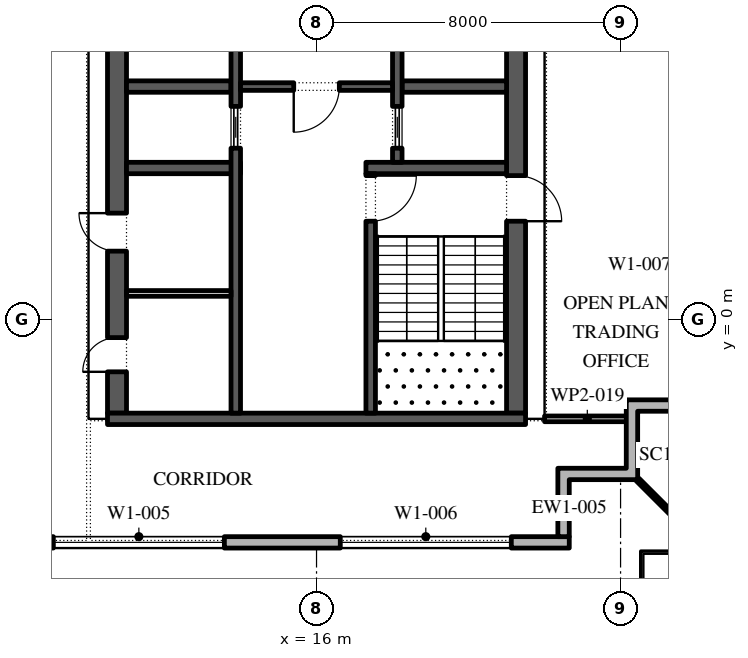
"""IFC4 building model, lengths in metres.
Left out: names, types, materials, properties, quantities, classifications, styles, units other than length and angle.
Written with IfcOpenShell. Run it as: python <this file> out.ifc"""

import sys

from ifc_helpers import new_model, si_unit, direction, frame, frame_2d, origin, place, context, subcontext, project, spatial, polyline, rectangle, outline, extrude, element, fill, save


model = new_model("IFC4")
c1 = context("Model", 3, precision=1e-05, world=origin(), true_north=direction((0.0, 1.0)))
c2 = subcontext(c1, "Body", "Model", "MODEL_VIEW")
j1 = project(units=[si_unit("LENGTHUNIT", "METRE"), si_unit("PLANEANGLEUNIT", "RADIAN")], contexts=[c1])
p1 = place(None, origin())
s1 = spatial("IfcSite", under=j1, at=p1, CompositionType="ELEMENT")
p2 = place(p1, origin())
s2 = spatial("IfcBuilding", under=s1, at=p2, CompositionType="ELEMENT")
p3 = place(p2, frame((0.0, 0.0, 330.0)))
s3 = spatial("IfcBuildingStorey", under=s2, at=p3, CompositionType="ELEMENT", Elevation=330.0)
p4 = place(p3, frame((-22.35, -5.85, 0.0), z_axis=(0.0, 0.0, 1.0), x_axis=(1.0, 0.0, 0.0)))
e1 = element("IfcWall", 1, at=p4, inside=s3, PredefinedType="STANDARD", context=c2, shape_type="SweptSolid", body=[
    extrude(rectangle(XDim=45.0, YDim=0.3, at=frame_2d((22.5, 0.0))), origin(), (0.0, 0.0, 1.0), 4.0),
])
p5 = place(p4, frame((1.375, 0.0, 0.45)))
e2 = element("IfcOpeningElement", 2, at=p5, cuts=e1, PredefinedType="OPENING", context=c2, shape_type="SweptSolid", body=[
    extrude(rectangle(XDim=4.5, YDim=3.05, at=frame_2d((2.25, 1.525))), frame((0.0, 0.16, 0.0), z_axis=(0.0, -1.0, 0.0), x_axis=(1.0, 0.0, 0.0)), (0.0, 0.0, 1.0), 0.32),
])
p6 = place(p4, frame((8.775, 0.0, 0.45)))
e3 = element("IfcOpeningElement", 3, at=p6, cuts=e1, PredefinedType="OPENING", context=c2, shape_type="SweptSolid", body=[
    extrude(rectangle(XDim=4.5, YDim=3.05, at=frame_2d((2.25, 1.525))), frame((0.0, 0.16, 0.0), z_axis=(0.0, -1.0, 0.0), x_axis=(1.0, 0.0, 0.0)), (0.0, 0.0, 1.0), 0.32),
])
p7 = place(p4, frame((17.375, 0.0, 0.0)))
e4 = element("IfcOpeningElement", 4, at=p7, cuts=e1, PredefinedType="OPENING", context=c2, shape_type="SweptSolid", body=[
    extrude(rectangle(XDim=2.4, YDim=3.5, at=frame_2d((1.2, 1.75))), frame((0.0, 0.16, 0.0), z_axis=(0.0, -1.0, 0.0), x_axis=(1.0, 0.0, 0.0)), (0.0, 0.0, 1.0), 0.32),
])
p8 = place(p4, frame((23.875, 0.0, 0.45)))
e5 = element("IfcOpeningElement", 5, at=p8, cuts=e1, PredefinedType="OPENING", context=c2, shape_type="SweptSolid", body=[
    extrude(rectangle(XDim=4.5, YDim=3.05, at=frame_2d((2.25, 1.525))), frame((0.0, 0.16, 0.0), z_axis=(0.0, -1.0, 0.0), x_axis=(1.0, 0.0, 0.0)), (0.0, 0.0, 1.0), 0.32),
])
p9 = place(p4, frame((31.425, 0.0, 0.45)))
e6 = element("IfcOpeningElement", 6, at=p9, cuts=e1, PredefinedType="OPENING", context=c2, shape_type="SweptSolid", body=[
    extrude(rectangle(XDim=4.5, YDim=3.05, at=frame_2d((2.25, 1.525))), frame((0.0, 0.16, 0.0), z_axis=(0.0, -1.0, 0.0), x_axis=(1.0, 0.0, 0.0)), (0.0, 0.0, 1.0), 0.32),
])
p10 = place(p4, frame((38.975, 0.0, 0.45)))
e7 = element("IfcOpeningElement", 7, at=p10, cuts=e1, PredefinedType="OPENING", context=c2, shape_type="SweptSolid", body=[
    extrude(rectangle(XDim=4.5, YDim=3.05, at=frame_2d((2.25, 1.525))), frame((0.0, 0.16, 0.0), z_axis=(0.0, -1.0, 0.0), x_axis=(1.0, 0.0, 0.0)), (0.0, 0.0, 1.0), 0.32),
])
p11 = place(p3, origin())
e8 = element("IfcWall", 8, at=p11, inside=s3, PredefinedType="STANDARD", context=c2, shape_type="SweptSolid", body=[
    extrude(outline(polyline([(24.15, -3.9), (24.15, -2.1), (26.25, -2.1), (26.25, -2.4), (24.45, -2.4), (24.45, -4.2), (22.65, -4.2), (22.65, -5.7), (22.35, -5.7), (22.35, -3.9), (24.15, -3.9)])), origin(), (0.0, 0.0, 1.0), 4.0),
])
p12 = place(p3, frame((24.45, -4.2, -0.05), z_axis=(0.0, 0.0, 1.0), x_axis=(0.707106781187, -0.707106781187, 0.0)))
e9 = element("IfcWall", 9, at=p12, inside=s3, PredefinedType="STANDARD", context=c2, shape_type="SweptSolid", body=[
    extrude(rectangle(XDim=2.667, YDim=0.1, at=frame_2d((1.333, 0.0))), origin(), (0.0, 0.0, 1.0), 4.05),
])
p13 = place(p3, frame((21.25, -2.45, 0.0), z_axis=(0.0, 0.0, 1.0), x_axis=(0.0, 1.0, 0.0)))
e10 = element("IfcWall", 10, at=p13, inside=s3, PredefinedType="SHEAR", context=c2, shape_type="SweptSolid", body=[
    extrude(rectangle(XDim=27.9, YDim=0.5, at=frame_2d((13.95, 0.0))), origin(), (0.0, 0.0, 1.0), 4.0),
])
p14 = place(p13, frame((5.05, 0.0, 0.0)))
e11 = element("IfcOpeningElement", 11, at=p14, cuts=e10, PredefinedType="OPENING", context=c2, shape_type="SweptSolid", body=[
    extrude(rectangle(XDim=1.2, YDim=2.1, at=frame_2d((0.6, 1.05))), frame((0.0, 0.26, 0.0), z_axis=(0.0, -1.0, 0.0), x_axis=(1.0, 0.0, 0.0)), (0.0, 0.0, 1.0), 0.52),
])
p15 = place(p13, frame((21.65, 0.0, 0.0)))
e12 = element("IfcOpeningElement", 12, at=p15, cuts=e10, PredefinedType="OPENING", context=c2, shape_type="SweptSolid", body=[
    extrude(rectangle(XDim=1.2, YDim=2.1, at=frame_2d((0.6, 1.05))), frame((0.0, 0.26, 0.0), z_axis=(0.0, -1.0, 0.0), x_axis=(1.0, 0.0, 0.0)), (0.0, 0.0, 1.0), 0.52),
])
p16 = place(p3, frame((10.75, -2.45, 0.0), z_axis=(0.0, 0.0, 1.0), x_axis=(0.0, 1.0, 0.0)))
e13 = element("IfcWall", 13, at=p16, inside=s3, PredefinedType="SHEAR", context=c2, shape_type="SweptSolid", body=[
    extrude(rectangle(XDim=27.9, YDim=0.5, at=frame_2d((13.95, 0.0))), origin(), (0.0, 0.0, 1.0), 4.0),
])
p17 = place(p16, frame((23.65, 0.0, 0.0)))
e14 = element("IfcOpeningElement", 14, at=p17, cuts=e13, PredefinedType="OPENING", context=c2, shape_type="SweptSolid", body=[
    extrude(rectangle(XDim=2.4, YDim=2.1, at=frame_2d((1.2, 1.05))), frame((0.0, 0.26, 0.0), z_axis=(0.0, -1.0, 0.0), x_axis=(1.0, 0.0, 0.0)), (0.0, 0.0, 1.0), 0.52),
])
p18 = place(p16, frame((1.087, 0.0, 0.0)))
e15 = element("IfcOpeningElement", 15, at=p18, cuts=e13, PredefinedType="OPENING", context=c2, shape_type="SweptSolid", body=[
    extrude(rectangle(XDim=0.9, YDim=2.1, at=frame_2d((0.45, 1.05))), frame((0.0, 0.26, 0.0), z_axis=(0.0, -1.0, 0.0), x_axis=(1.0, 0.0, 0.0)), (0.0, 0.0, 1.0), 0.52),
])
p19 = place(p16, frame((4.262, 0.0, 0.0)))
e16 = element("IfcOpeningElement", 16, at=p19, cuts=e13, PredefinedType="OPENING", context=c2, shape_type="SweptSolid", body=[
    extrude(rectangle(XDim=1.0, YDim=2.1, at=frame_2d((0.5, 1.05))), frame((0.0, 0.26, 0.0), z_axis=(0.0, -1.0, 0.0), x_axis=(1.0, 0.0, 0.0)), (0.0, 0.0, 1.0), 0.52),
])
p20 = place(p3, frame((10.5, -2.6, 0.0), z_axis=(0.0, 0.0, 1.0), x_axis=(1.0, 0.0, 0.0)))
e17 = element("IfcWall", 17, at=p20, inside=s3, PredefinedType="SHEAR", context=c2, shape_type="SweptSolid", body=[
    extrude(rectangle(XDim=11.0, YDim=0.3, at=frame_2d((5.5, 0.0))), origin(), (0.0, 0.0, 1.0), 4.0),
])
p21 = place(p3, frame((17.3, 4.0, 0.0), z_axis=(0.0, 0.0, 1.0), x_axis=(1.0, 0.0, 0.0)))
e18 = element("IfcWall", 18, at=p21, inside=s3, PredefinedType="SHEAR", context=c2, shape_type="SweptSolid", body=[
    extrude(rectangle(XDim=3.7, YDim=0.3, at=frame_2d((1.85, 0.0))), origin(), (0.0, 0.0, 1.0), 4.0),
])
p22 = place(p3, frame((17.425, -2.45, 0.0), z_axis=(0.0, 0.0, 1.0), x_axis=(0.0, 1.0, 0.0)))
e19 = element("IfcWall", 19, at=p22, inside=s3, PredefinedType="SHEAR", context=c2, shape_type="SweptSolid", body=[
    extrude(rectangle(XDim=6.3, YDim=0.25, at=frame_2d((3.15, 0.0))), origin(), (0.0, 0.0, 1.0), 4.0),
])
p23 = place(p22, frame((5.05, 0.0, 0.0)))
e20 = element("IfcOpeningElement", 20, at=p23, cuts=e19, PredefinedType="OPENING", context=c2, shape_type="SweptSolid", body=[
    extrude(rectangle(XDim=1.2, YDim=2.1, at=frame_2d((0.6, 1.05))), frame((0.0, 0.135, 0.0), z_axis=(0.0, -1.0, 0.0), x_axis=(1.0, 0.0, 0.0)), (0.0, 0.0, 1.0), 0.27),
])
p24 = place(p3, frame((18.25, 6.143, 0.0), z_axis=(0.0, 0.0, 1.0), x_axis=(1.0, 0.0, 0.0)))
e21 = element("IfcWall", 21, at=p24, inside=s3, PredefinedType="SHEAR", context=c2, shape_type="SweptSolid", body=[
    extrude(rectangle(XDim=2.75, YDim=0.3, at=frame_2d((1.375, 0.0))), origin(), (0.0, 0.0, 1.0), 4.0),
])
p25 = place(p3, frame((18.125, 4.15, 0.0), z_axis=(0.0, 0.0, 1.0), x_axis=(0.0, 1.0, 0.0)))
e22 = element("IfcWall", 22, at=p25, inside=s3, PredefinedType="SHEAR", context=c2, shape_type="SweptSolid", body=[
    extrude(rectangle(XDim=14.7, YDim=0.25, at=frame_2d((7.35, 0.0))), origin(), (0.0, 0.0, 1.0), 4.0),
])
p26 = place(p25, frame((3.596, 0.0, 0.0)))
e23 = element("IfcOpeningElement", 23, at=p26, cuts=e22, PredefinedType="OPENING", context=c2, shape_type="SweptSolid", body=[
    extrude(rectangle(XDim=0.9, YDim=2.1, at=frame_2d((0.45, 1.05))), frame((0.0, 0.135, 0.0), z_axis=(0.0, -1.0, 0.0), x_axis=(1.0, 0.0, 0.0)), (0.0, 0.0, 1.0), 0.27),
])
p27 = place(p25, frame((9.875, 0.0, 0.0)))
e24 = element("IfcOpeningElement", 24, at=p27, cuts=e22, PredefinedType="OPENING", context=c2, shape_type="SweptSolid", body=[
    extrude(rectangle(XDim=0.9, YDim=2.1, at=frame_2d((0.45, 1.05))), frame((0.0, 0.135, 0.0), z_axis=(0.0, -1.0, 0.0), x_axis=(1.0, 0.0, 0.0)), (0.0, 0.0, 1.0), 0.27),
])
p28 = place(p25, frame((0.371, 0.0, 0.0)))
e25 = element("IfcOpeningElement", 25, at=p28, cuts=e22, PredefinedType="OPENING", context=c2, shape_type="SweptSolid", body=[
    extrude(rectangle(XDim=1.1, YDim=2.1, at=frame_2d((0.55, 1.05))), frame((0.0, 0.135, 0.0), z_axis=(0.0, -1.0, 0.0), x_axis=(1.0, 0.0, 0.0)), (0.0, 0.0, 1.0), 0.27),
])
p29 = place(p3, frame((11.0, 4.0, 0.0), z_axis=(0.0, 0.0, 1.0), x_axis=(1.0, 0.0, 0.0)))
e26 = element("IfcWall", 26, at=p29, inside=s3, PredefinedType="SHEAR", context=c2, shape_type="SweptSolid", body=[
    extrude(rectangle(XDim=3.0, YDim=0.3, at=frame_2d((1.5, 0.0))), origin(), (0.0, 0.0, 1.0), 4.0),
])
p30 = place(p3, frame((11.0, 6.143, 0.0), z_axis=(0.0, 0.0, 1.0), x_axis=(1.0, 0.0, 0.0)))
e27 = element("IfcWall", 27, at=p30, inside=s3, PredefinedType="SHEAR", context=c2, shape_type="SweptSolid", body=[
    extrude(rectangle(XDim=2.75, YDim=0.3, at=frame_2d((1.375, 0.0))), origin(), (0.0, 0.0, 1.0), 4.0),
])
p31 = place(p3, frame((13.875, -2.45, 0.0), z_axis=(0.0, 0.0, 1.0), x_axis=(0.0, 1.0, 0.0)))
e28 = element("IfcWall", 28, at=p31, inside=s3, PredefinedType="SHEAR", context=c2, shape_type="SweptSolid", body=[
    extrude(rectangle(XDim=21.3, YDim=0.25, at=frame_2d((10.65, 0.0))), origin(), (0.0, 0.0, 1.0), 4.0),
])
p32 = place(p31, frame((11.357, 0.0, 0.0)))
e29 = element("IfcOpeningElement", 29, at=p32, cuts=e28, PredefinedType="OPENING", context=c2, shape_type="SweptSolid", body=[
    extrude(rectangle(XDim=0.9, YDim=2.1, at=frame_2d((0.45, 1.05))), frame((0.0, 0.135, 0.0), z_axis=(0.0, -1.0, 0.0), x_axis=(1.0, 0.0, 0.0)), (0.0, 0.0, 1.0), 0.27),
])
p33 = place(p31, frame((6.971, 0.0, 0.0)))
e30 = element("IfcOpeningElement", 30, at=p33, cuts=e28, PredefinedType="OPENING", context=c2, shape_type="SweptSolid", body=[
    extrude(rectangle(XDim=1.1, YDim=2.1, at=frame_2d((0.55, 1.05))), frame((0.0, 0.135, 0.0), z_axis=(0.0, -1.0, 0.0), x_axis=(1.0, 0.0, 0.0)), (0.0, 0.0, 1.0), 0.27),
])
p34 = place(p31, frame((15.543, 0.0, 0.0)))
e31 = element("IfcOpeningElement", 31, at=p34, cuts=e28, PredefinedType="OPENING", context=c2, shape_type="SweptSolid", body=[
    extrude(rectangle(XDim=1.1, YDim=2.1, at=frame_2d((0.55, 1.05))), frame((0.0, 0.135, 0.0), z_axis=(0.0, -1.0, 0.0), x_axis=(1.0, 0.0, 0.0)), (0.0, 0.0, 1.0), 0.27),
])
p35 = place(p31, frame((17.686, 0.0, 0.0)))
e32 = element("IfcOpeningElement", 32, at=p35, cuts=e28, PredefinedType="OPENING", context=c2, shape_type="SweptSolid", body=[
    extrude(rectangle(XDim=1.1, YDim=2.1, at=frame_2d((0.55, 1.05))), frame((0.0, 0.135, 0.0), z_axis=(0.0, -1.0, 0.0), x_axis=(1.0, 0.0, 0.0)), (0.0, 0.0, 1.0), 0.27),
])
p36 = place(p31, frame((19.829, 0.0, 0.0)))
e33 = element("IfcOpeningElement", 33, at=p36, cuts=e28, PredefinedType="OPENING", context=c2, shape_type="SweptSolid", body=[
    extrude(rectangle(XDim=1.1, YDim=2.1, at=frame_2d((0.55, 1.05))), frame((0.0, 0.135, 0.0), z_axis=(0.0, -1.0, 0.0), x_axis=(1.0, 0.0, 0.0)), (0.0, 0.0, 1.0), 0.27),
])
p37 = place(p3, frame((14.0, 6.143, 0.0), z_axis=(0.0, 0.0, 1.0), x_axis=(1.0, 0.0, 0.0)))
e34 = element("IfcWall", 34, at=p37, inside=s3, PredefinedType="SHEAR", context=c2, shape_type="SweptSolid", body=[
    extrude(rectangle(XDim=4.0, YDim=0.2, at=frame_2d((2.0, 0.0))), origin(), (0.0, 0.0, 1.0), 4.0),
])
p38 = place(p37, frame((1.4, 0.0, 0.0)))
e35 = element("IfcOpeningElement", 35, at=p38, cuts=e34, PredefinedType="OPENING", context=c2, shape_type="SweptSolid", body=[
    extrude(rectangle(XDim=1.2, YDim=2.1, at=frame_2d((0.6, 1.05))), frame((0.0, 0.11, 0.0), z_axis=(0.0, -1.0, 0.0), x_axis=(1.0, 0.0, 0.0)), (0.0, 0.0, 1.0), 0.22),
])
p39 = place(p3, frame((11.0, 0.7, 0.0), z_axis=(0.0, 0.0, 1.0), x_axis=(1.0, 0.0, 0.0)))
e36 = element("IfcWall", 36, at=p39, inside=s3, PredefinedType="PARTITIONING", context=c2, shape_type="SweptSolid", body=[
    extrude(rectangle(XDim=2.75, YDim=0.15, at=frame_2d((1.375, 0.0))), origin(), (0.0, 0.0, 1.0), 4.0),
])
p40 = place(p3, frame((22.0, -2.6, 0.0), z_axis=(0.0, 0.0, 1.0), x_axis=(1.0, 0.0, 0.0)))
e37 = element("IfcWall", 37, at=p40, inside=s3, PredefinedType="PARTITIONING", context=c2, shape_type="SweptSolid", body=[
    extrude(rectangle(XDim=2.25, YDim=0.15, at=frame_2d((1.125, 0.0))), origin(), (0.0, 0.0, 1.0), 4.0),
])
p41 = place(p9, origin())
e38 = element("IfcWindow", 38, at=p41, inside=s3, PartitioningType="DOUBLE_PANEL_VERTICAL", PredefinedType="WINDOW", context=c2, shape_type="SweptSolid", body=[
    extrude(rectangle(XDim=4.5, YDim=3.05, at=frame_2d((2.25, 1.525))), frame((0.0, 0.03, 0.0), z_axis=(0.0, -1.0, 0.0), x_axis=(1.0, 0.0, 0.0)), (0.0, 0.0, 1.0), 0.06),
])
fill(e6, e38)
p42 = place(p10, origin())
e39 = element("IfcWindow", 39, at=p42, inside=s3, PartitioningType="DOUBLE_PANEL_VERTICAL", PredefinedType="WINDOW", context=c2, shape_type="SweptSolid", body=[
    extrude(rectangle(XDim=4.5, YDim=3.05, at=frame_2d((2.25, 1.525))), frame((0.0, 0.03, 0.0), z_axis=(0.0, -1.0, 0.0), x_axis=(1.0, 0.0, 0.0)), (0.0, 0.0, 1.0), 0.06),
])
fill(e7, e39)
p43 = place(p28, origin())
e40 = element("IfcDoor", 40, at=p43, inside=s3, OperationType="SLIDING_TO_LEFT", PredefinedType="DOOR", context=c2, shape_type="SweptSolid", body=[
    extrude(rectangle(XDim=1.1, YDim=2.1, at=frame_2d((0.55, 1.05))), frame((0.0, 0.025, 0.0), z_axis=(0.0, -1.0, 0.0), x_axis=(1.0, 0.0, 0.0)), (0.0, 0.0, 1.0), 0.05),
])
fill(e25, e40)
p44 = place(p33, origin())
e41 = element("IfcDoor", 41, at=p44, inside=s3, OperationType="SLIDING_TO_LEFT", PredefinedType="DOOR", context=c2, shape_type="SweptSolid", body=[
    extrude(rectangle(XDim=1.1, YDim=2.1, at=frame_2d((0.55, 1.05))), frame((0.0, 0.025, 0.0), z_axis=(0.0, -1.0, 0.0), x_axis=(1.0, 0.0, 0.0)), (0.0, 0.0, 1.0), 0.05),
])
fill(e30, e41)
p45 = place(p38, frame((1.2, 0.0, 0.0), z_axis=(0.0, 0.0, 1.0), x_axis=(-1.0, 0.0, 0.0)))
e42 = element("IfcDoor", 42, at=p45, inside=s3, OperationType="SINGLE_SWING_LEFT", PredefinedType="DOOR", context=c2, shape_type="SweptSolid", body=[
    extrude(rectangle(XDim=1.2, YDim=2.1, at=frame_2d((0.6, 1.05))), frame((0.0, 0.025, 0.0), z_axis=(0.0, -1.0, 0.0), x_axis=(1.0, 0.0, 0.0)), (0.0, 0.0, 1.0), 0.05),
])
fill(e35, e42)
p46 = place(p23, frame((1.2, 0.0, 0.0), z_axis=(0.0, 0.0, 1.0), x_axis=(-1.0, 0.0, 0.0)))
e43 = element("IfcDoor", 43, at=p46, inside=s3, OperationType="SINGLE_SWING_RIGHT", PredefinedType="DOOR", context=c2, shape_type="SweptSolid", body=[
    extrude(rectangle(XDim=1.2, YDim=2.1, at=frame_2d((0.6, 1.05))), frame((0.0, 0.025, 0.0), z_axis=(0.0, -1.0, 0.0), x_axis=(1.0, 0.0, 0.0)), (0.0, 0.0, 1.0), 0.05),
])
fill(e20, e43)
p47 = place(p14, frame((1.2, 0.0, 0.0), z_axis=(0.0, 0.0, 1.0), x_axis=(-1.0, 0.0, 0.0)))
e44 = element("IfcDoor", 44, at=p47, inside=s3, OperationType="SINGLE_SWING_LEFT", PredefinedType="DOOR", context=c2, shape_type="SweptSolid", body=[
    extrude(rectangle(XDim=1.2, YDim=2.1, at=frame_2d((0.6, 1.05))), frame((0.0, 0.025, 0.0), z_axis=(0.0, -1.0, 0.0), x_axis=(1.0, 0.0, 0.0)), (0.0, 0.0, 1.0), 0.05),
])
fill(e11, e44)
p48 = place(p18, origin())
e45 = element("IfcDoor", 45, at=p48, inside=s3, OperationType="SINGLE_SWING_RIGHT", PredefinedType="DOOR", context=c2, shape_type="SweptSolid", body=[
    extrude(rectangle(XDim=0.9, YDim=2.1, at=frame_2d((0.45, 1.05))), frame((0.0, -0.2, 0.0), z_axis=(0.0, -1.0, 0.0), x_axis=(1.0, 0.0, 0.0)), (0.0, 0.0, 1.0), 0.05),
])
fill(e15, e45)
p49 = place(p19, origin())
e46 = element("IfcDoor", 46, at=p49, inside=s3, OperationType="SINGLE_SWING_LEFT", PredefinedType="DOOR", context=c2, shape_type="SweptSolid", body=[
    extrude(rectangle(XDim=1.0, YDim=2.1, at=frame_2d((0.5, 1.05))), frame((0.0, -0.2, 0.0), z_axis=(0.0, -1.0, 0.0), x_axis=(1.0, 0.0, 0.0)), (0.0, 0.0, 1.0), 0.05),
])
fill(e16, e46)
save(model, sys.argv[1])
